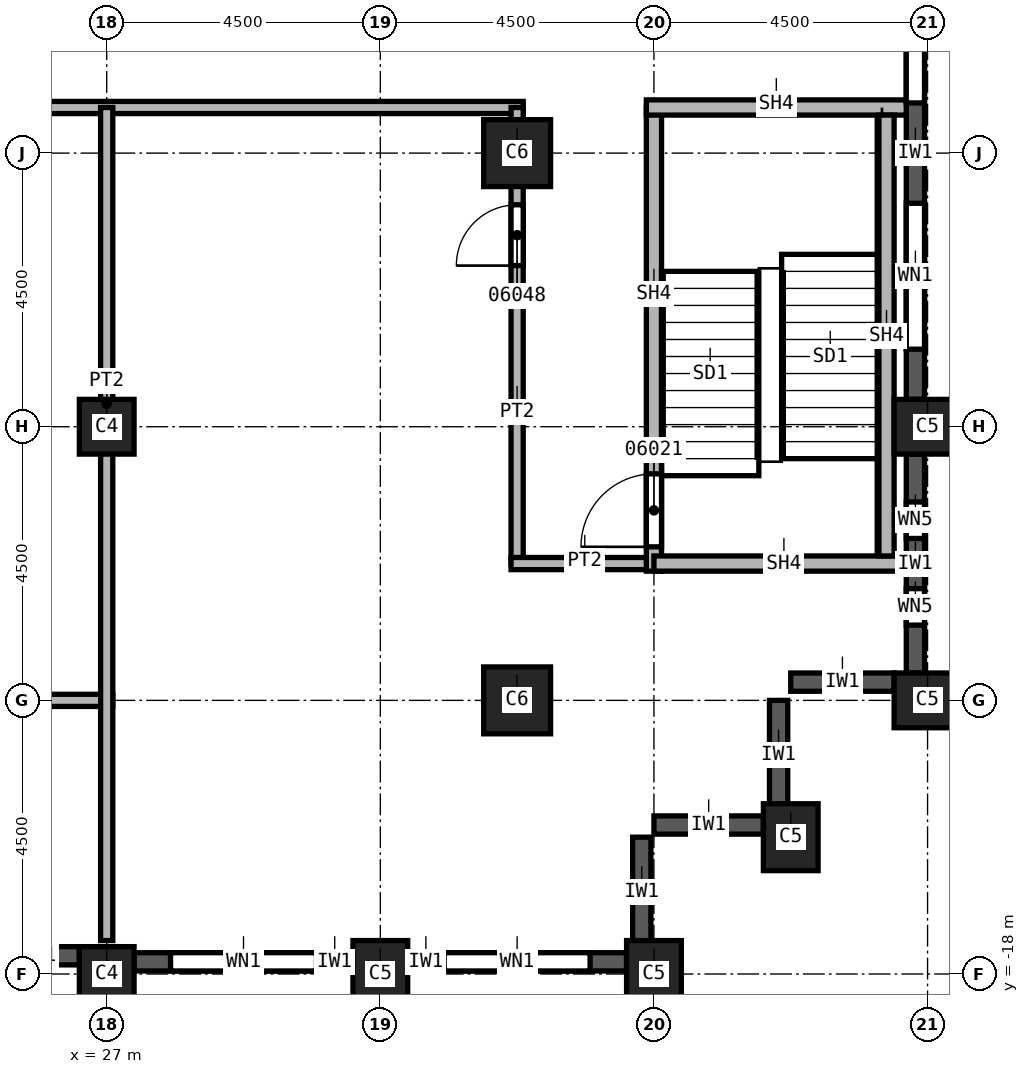
"""IFC4 building model, lengths in metres.
Left out: names, types, materials, properties, quantities, classifications, styles, units other than length and angle.
Written with IfcOpenShell. Run it as: python <this file> out.ifc"""

import sys

from ifc_helpers import new_model, si_unit, direction, frame, frame_2d, origin, origin_2d, place, context, subcontext, project, spatial, rectangle, extrude, element, fill, save


model = new_model("IFC4")
c1 = context("Model", 3, precision=1e-05, world=origin(), true_north=direction((0.0, 1.0)))
c2 = subcontext(c1, "Body", "Model", "MODEL_VIEW")
j1 = project(units=[si_unit("LENGTHUNIT", "METRE"), si_unit("PLANEANGLEUNIT", "RADIAN")], contexts=[c1])
p1 = place(None, origin())
s1 = spatial("IfcSite", under=j1, at=p1, CompositionType="ELEMENT")
p2 = place(p1, origin())
s2 = spatial("IfcBuilding", under=s1, at=p2, CompositionType="ELEMENT")
p3 = place(p2, frame((0.0, 0.0, 130.0)))
s3 = spatial("IfcBuildingStorey", under=s2, at=p3, CompositionType="ELEMENT", Elevation=130.0)
for number, where, z_axis, x_axis in (
    (1, (40.5, -9.0, 0.0), (0.0, 0.0, 1.0), (0.0, 1.0, 0.0)),
    (2, (40.5, -13.5, 0.0), (0.0, 0.0, 1.0), (0.0, 1.0, 0.0)),
    (3, (38.25, -15.75, 0.0), (0.0, 0.0, 1.0), (1.0, 0.0, 0.0)),
    (4, (31.5, -18.0, 0.0), (0.0, 0.0, 1.0), (1.0, 0.0, 0.0)),
    (5, (36.0, -18.0, 0.0), (0.0, 0.0, 1.0), (1.0, 0.0, 0.0)),
):
    element("IfcColumn", number, at=place(p3, frame(where, z_axis=z_axis, x_axis=x_axis)), inside=s3, PredefinedType="COLUMN", context=c2, shape_type="SweptSolid", body=[
        extrude(rectangle(XDim=0.9, YDim=1.1, at=origin_2d()), origin(), (0.0, 0.0, 1.0), 3.7),
    ])
for number, where, z_axis, x_axis in (
    (6, (33.75, -4.5, 0.0), (0.0, 0.0, 1.0), (1.0, 0.0, 0.0)),
    (7, (33.75, -13.5, 0.0), (0.0, 0.0, 1.0), (1.0, 0.0, 0.0)),
):
    element("IfcColumn", number, at=place(p3, frame(where, z_axis=z_axis, x_axis=x_axis)), inside=s3, PredefinedType="COLUMN", context=c2, shape_type="SweptSolid", body=[
        extrude(rectangle(XDim=1.1, YDim=1.1, at=origin_2d()), origin(), (0.0, 0.0, 1.0), 3.7),
    ])
for number, where, z_axis, x_axis in (
    (8, (27.0, -9.0, 0.0), (0.0, 0.0, 1.0), (1.0, 0.0, 0.0)),
    (9, (27.0, -18.0, 0.0), (0.0, 0.0, 1.0), (1.0, 0.0, 0.0)),
):
    element("IfcColumn", number, at=place(p3, frame(where, z_axis=z_axis, x_axis=x_axis)), inside=s3, PredefinedType="COLUMN", context=c2, shape_type="SweptSolid", body=[
        extrude(rectangle(XDim=0.9, YDim=0.9, at=origin_2d()), origin(), (0.0, 0.0, 1.0), 3.7),
    ])
for number, where, z_axis, x_axis in (
    (10, (35.8, -17.55, 0.0), (0.0, 0.0, 1.0), (0.0, 1.0, 0.0)),
    (11, (37.8, -15.55, 0.0), (0.0, 0.0, 1.0), (-1.0, 0.0, 0.0)),
    (12, (38.05, -15.3, 0.0), (0.0, 0.0, 1.0), (0.0, 1.0, 0.0)),
):
    element("IfcWall", number, at=place(p3, frame(where, z_axis=z_axis, x_axis=x_axis)), inside=s3, PredefinedType="SOLIDWALL", context=c2, shape_type="SweptSolid", body=[
        extrude(rectangle(XDim=1.8, YDim=0.3, at=frame_2d((0.9, 0.0))), origin(), (0.0, 0.0, 1.0), 3.1),
    ])
p4 = place(p3, frame((39.95, -13.2, 0.0), z_axis=(0.0, 0.0, 1.0), x_axis=(-1.0, 0.0, 0.0)))
e13 = element("IfcWall", 13, at=p4, inside=s3, PredefinedType="SOLIDWALL", context=c2, shape_type="SweptSolid", body=[
    extrude(rectangle(XDim=1.7, YDim=0.3, at=frame_2d((0.85, 0.0))), origin(), (0.0, 0.0, 1.0), 3.1),
])
p5 = place(p3, frame((25.2, -17.7, 0.0), z_axis=(0.0, 0.0, 1.0), x_axis=(1.0, 0.0, 0.0)))
e14 = element("IfcWall", 14, at=p5, inside=s3, PredefinedType="SOLIDWALL", context=c2, shape_type="SweptSolid", body=[
    extrude(rectangle(XDim=1.35, YDim=0.3, at=frame_2d((0.675, 0.0))), origin(), (0.0, 0.0, 1.0), 3.1),
])
p6 = place(p3, frame((27.45, -17.8, 0.0), z_axis=(0.0, 0.0, 1.0), x_axis=(1.0, 0.0, 0.0)))
e15 = element("IfcWall", 15, at=p6, inside=s3, PredefinedType="SOLIDWALL", context=c2, shape_type="SweptSolid", body=[
    extrude(rectangle(XDim=3.6, YDim=0.3, at=frame_2d((1.8, 0.0))), origin(), (0.0, 0.0, 1.0), 3.1),
])
p7 = place(p6, frame((0.6, 0.0, 0.8)))
e16 = element("IfcOpeningElement", 16, at=p7, cuts=e15, PredefinedType="OPENING", context=c2, shape_type="SweptSolid", body=[
    extrude(rectangle(XDim=2.4, YDim=1.95, at=frame_2d((1.2, 0.975))), frame((0.0, 0.15, 0.0), z_axis=(0.0, -1.0, 0.0), x_axis=(1.0, 0.0, 0.0)), (0.0, 0.0, 1.0), 0.3),
])
p8 = place(p3, frame((31.95, -17.8, 0.0), z_axis=(0.0, 0.0, 1.0), x_axis=(1.0, 0.0, 0.0)))
e17 = element("IfcWall", 17, at=p8, inside=s3, PredefinedType="SOLIDWALL", context=c2, shape_type="SweptSolid", body=[
    extrude(rectangle(XDim=3.6, YDim=0.3, at=frame_2d((1.8, 0.0))), origin(), (0.0, 0.0, 1.0), 3.1),
])
p9 = place(p8, frame((0.6, 0.0, 0.8)))
e18 = element("IfcOpeningElement", 18, at=p9, cuts=e17, PredefinedType="OPENING", context=c2, shape_type="SweptSolid", body=[
    extrude(rectangle(XDim=2.4, YDim=1.95, at=frame_2d((1.2, 0.975))), frame((0.0, 0.15, 0.0), z_axis=(0.0, -1.0, 0.0), x_axis=(1.0, 0.0, 0.0)), (0.0, 0.0, 1.0), 0.3),
])
p10 = place(p3, frame((40.3, -13.05, 0.0), z_axis=(0.0, 0.0, 1.0), x_axis=(0.0, 1.0, 0.0)))
e19 = element("IfcWall", 19, at=p10, inside=s3, PredefinedType="SOLIDWALL", context=c2, shape_type="SweptSolid", body=[
    extrude(rectangle(XDim=3.6, YDim=0.3, at=frame_2d((1.8, 0.0))), origin(), (0.0, 0.0, 1.0), 3.1),
])
p11 = place(p10, frame((0.788, 0.0, 0.8)))
e20 = element("IfcOpeningElement", 20, at=p11, cuts=e19, PredefinedType="OPENING", context=c2, shape_type="SweptSolid", body=[
    extrude(rectangle(XDim=0.6, YDim=1.95, at=frame_2d((0.3, 0.975))), frame((0.0, 0.15, 0.0), z_axis=(0.0, -1.0, 0.0), x_axis=(1.0, 0.0, 0.0)), (0.0, 0.0, 1.0), 0.3),
])
p12 = place(p10, frame((2.212, 0.0, 0.8)))
e21 = element("IfcOpeningElement", 21, at=p12, cuts=e19, PredefinedType="OPENING", context=c2, shape_type="SweptSolid", body=[
    extrude(rectangle(XDim=0.6, YDim=1.95, at=frame_2d((0.3, 0.975))), frame((0.0, 0.15, 0.0), z_axis=(0.0, -1.0, 0.0), x_axis=(1.0, 0.0, 0.0)), (0.0, 0.0, 1.0), 0.3),
])
p13 = place(p3, frame((40.3, -8.55, 0.0), z_axis=(0.0, 0.0, 1.0), x_axis=(0.0, 1.0, 0.0)))
e22 = element("IfcWall", 22, at=p13, inside=s3, PredefinedType="SOLIDWALL", context=c2, shape_type="SweptSolid", body=[
    extrude(rectangle(XDim=8.1, YDim=0.3, at=frame_2d((4.05, 0.0))), origin(), (0.0, 0.0, 1.0), 3.1),
])
p14 = place(p13, frame((0.825, 0.0, 0.8)))
e23 = element("IfcOpeningElement", 23, at=p14, cuts=e22, PredefinedType="OPENING", context=c2, shape_type="SweptSolid", body=[
    extrude(rectangle(XDim=2.4, YDim=1.95, at=frame_2d((1.2, 0.975))), frame((0.0, 0.15, 0.0), z_axis=(0.0, -1.0, 0.0), x_axis=(1.0, 0.0, 0.0)), (0.0, 0.0, 1.0), 0.3),
])
p15 = place(p13, frame((4.875, 0.0, 0.8)))
e24 = element("IfcOpeningElement", 24, at=p15, cuts=e22, PredefinedType="OPENING", context=c2, shape_type="SweptSolid", body=[
    extrude(rectangle(XDim=2.4, YDim=1.95, at=frame_2d((1.2, 0.975))), frame((0.0, 0.15, 0.0), z_axis=(0.0, -1.0, 0.0), x_axis=(1.0, 0.0, 0.0)), (0.0, 0.0, 1.0), 0.3),
])
p16 = place(p3, frame((15.4, -13.5, 0.0), z_axis=(0.0, 0.0, 1.0), x_axis=(1.0, 0.0, 0.0)))
e25 = element("IfcWall", 25, at=p16, inside=s3, PredefinedType="PARTITIONING", context=c2, shape_type="SweptSolid", body=[
    extrude(rectangle(XDim=11.7, YDim=0.2, at=frame_2d((5.85, 0.0))), origin(), (0.0, 0.0, 1.0), 3.7),
])
p17 = place(p3, frame((33.85, -3.75, 0.0), z_axis=(0.0, 0.0, 1.0), x_axis=(-1.0, 0.0, 0.0)))
e26 = element("IfcWall", 26, at=p17, inside=s3, PredefinedType="PARTITIONING", context=c2, shape_type="SweptSolid", body=[
    extrude(rectangle(XDim=18.45, YDim=0.2, at=frame_2d((9.225, 0.0))), origin(), (0.0, 0.0, 1.0), 3.7),
])
p18 = place(p3, frame((27.0, -3.75, 0.0), z_axis=(0.0, 0.0, 1.0), x_axis=(0.0, -1.0, 0.0)))
e27 = element("IfcWall", 27, at=p18, inside=s3, PredefinedType="PARTITIONING", context=c2, shape_type="SweptSolid", body=[
    extrude(rectangle(XDim=13.7, YDim=0.2, at=frame_2d((6.85, 0.0))), origin(), (0.0, 0.0, 1.0), 3.7),
])
p19 = place(p3, frame((33.75, -11.25, 0.0), z_axis=(0.0, 0.0, 1.0), x_axis=(0.0, 1.0, 0.0)))
e28 = element("IfcWall", 28, at=p19, inside=s3, PredefinedType="PARTITIONING", context=c2, shape_type="SweptSolid", body=[
    extrude(rectangle(XDim=7.5, YDim=0.2, at=frame_2d((3.75, 0.0))), origin(), (0.0, 0.0, 1.0), 3.7),
])
p20 = place(p19, frame((4.9, 0.0, 0.0)))
e29 = element("IfcOpeningElement", 29, at=p20, cuts=e28, PredefinedType="OPENING", context=c2, shape_type="SweptSolid", body=[
    extrude(rectangle(XDim=1.0, YDim=2.1, at=frame_2d((0.5, 1.05))), frame((0.0, 0.1, 0.0), z_axis=(0.0, -1.0, 0.0), x_axis=(1.0, 0.0, 0.0)), (0.0, 0.0, 1.0), 0.2),
])
p21 = place(p3, frame((36.0, -11.25, 0.0), z_axis=(0.0, 0.0, 1.0), x_axis=(-1.0, 0.0, 0.0)))
e30 = element("IfcWall", 30, at=p21, inside=s3, PredefinedType="PARTITIONING", context=c2, shape_type="SweptSolid", body=[
    extrude(rectangle(XDim=2.35, YDim=0.2, at=frame_2d((1.175, 0.0))), origin(), (0.0, 0.0, 1.0), 3.7),
])
p22 = place(p3, frame((36.0, -11.375, 0.0), z_axis=(0.0, 0.0, 1.0), x_axis=(0.0, 1.0, 0.0)))
e31 = element("IfcWall", 31, at=p22, inside=s3, PredefinedType="SOLIDWALL", context=c2, shape_type="SweptSolid", body=[
    extrude(rectangle(XDim=7.625, YDim=0.25, at=frame_2d((3.812, 0.0))), origin(), (0.0, 0.0, 1.0), 3.7),
])
p23 = place(p22, frame((0.4, 0.0, 0.0)))
e32 = element("IfcOpeningElement", 32, at=p23, cuts=e31, PredefinedType="OPENING", context=c2, shape_type="SweptSolid", body=[
    extrude(rectangle(XDim=1.2, YDim=2.1, at=frame_2d((0.6, 1.05))), frame((0.0, 0.125, 0.0), z_axis=(0.0, -1.0, 0.0), x_axis=(1.0, 0.0, 0.0)), (0.0, 0.0, 1.0), 0.25),
])
p24 = place(p3, frame((40.15, -11.25, 0.0), z_axis=(0.0, 0.0, 1.0), x_axis=(-1.0, 0.0, 0.0)))
e33 = element("IfcWall", 33, at=p24, inside=s3, PredefinedType="SOLIDWALL", context=c2, shape_type="SweptSolid", body=[
    extrude(rectangle(XDim=4.15, YDim=0.25, at=frame_2d((2.075, 0.0))), origin(), (0.0, 0.0, 1.0), 3.7),
])
p25 = place(p3, frame((40.15, -3.75, 0.0), z_axis=(0.0, 0.0, 1.0), x_axis=(-1.0, 0.0, 0.0)))
e34 = element("IfcWall", 34, at=p25, inside=s3, PredefinedType="SOLIDWALL", context=c2, shape_type="SweptSolid", body=[
    extrude(rectangle(XDim=4.275, YDim=0.25, at=frame_2d((2.137, 0.0))), origin(), (0.0, 0.0, 1.0), 3.7),
])
p26 = place(p3, frame((39.825, -11.125, 0.0), z_axis=(0.0, 0.0, 1.0), x_axis=(0.0, 1.0, 0.0)))
e35 = element("IfcWall", 35, at=p26, inside=s3, PredefinedType="SOLIDWALL", context=c2, shape_type="SweptSolid", body=[
    extrude(rectangle(XDim=7.25, YDim=0.25, at=frame_2d((3.625, 0.0))), origin(), (0.0, 0.0, 1.0), 3.7),
])
p27 = place(p7, origin())
e36 = element("IfcWindow", 36, at=p27, inside=s3, PartitioningType="SINGLE_PANEL", PredefinedType="WINDOW", context=c2, shape_type="SweptSolid", body=[
    extrude(rectangle(XDim=2.4, YDim=1.95, at=frame_2d((1.2, 0.975))), frame((0.0, 0.03, 0.0), z_axis=(0.0, -1.0, 0.0), x_axis=(1.0, 0.0, 0.0)), (0.0, 0.0, 1.0), 0.06),
])
fill(e16, e36)
p28 = place(p9, origin())
e37 = element("IfcWindow", 37, at=p28, inside=s3, PartitioningType="SINGLE_PANEL", PredefinedType="WINDOW", context=c2, shape_type="SweptSolid", body=[
    extrude(rectangle(XDim=2.4, YDim=1.95, at=frame_2d((1.2, 0.975))), frame((0.0, 0.03, 0.0), z_axis=(0.0, -1.0, 0.0), x_axis=(1.0, 0.0, 0.0)), (0.0, 0.0, 1.0), 0.06),
])
fill(e18, e37)
p29 = place(p14, origin())
e38 = element("IfcWindow", 38, at=p29, inside=s3, PartitioningType="SINGLE_PANEL", PredefinedType="WINDOW", context=c2, shape_type="SweptSolid", body=[
    extrude(rectangle(XDim=2.4, YDim=1.95, at=frame_2d((1.2, 0.975))), frame((0.0, 0.03, 0.0), z_axis=(0.0, -1.0, 0.0), x_axis=(1.0, 0.0, 0.0)), (0.0, 0.0, 1.0), 0.06),
])
fill(e23, e38)
p30 = place(p15, origin())
e39 = element("IfcWindow", 39, at=p30, inside=s3, PartitioningType="SINGLE_PANEL", PredefinedType="WINDOW", context=c2, shape_type="SweptSolid", body=[
    extrude(rectangle(XDim=2.4, YDim=1.95, at=frame_2d((1.2, 0.975))), frame((0.0, 0.03, 0.0), z_axis=(0.0, -1.0, 0.0), x_axis=(1.0, 0.0, 0.0)), (0.0, 0.0, 1.0), 0.06),
])
fill(e24, e39)
p31 = place(p23, origin())
e40 = element("IfcDoor", 40, at=p31, inside=s3, OperationType="SINGLE_SWING_RIGHT", PredefinedType="DOOR", context=c2, shape_type="SweptSolid", body=[
    extrude(rectangle(XDim=1.2, YDim=2.1, at=frame_2d((0.6, 1.05))), frame((0.0, 0.025, 0.0), z_axis=(0.0, -1.0, 0.0), x_axis=(1.0, 0.0, 0.0)), (0.0, 0.0, 1.0), 0.05),
])
fill(e32, e40)
p32 = place(p20, origin())
e41 = element("IfcDoor", 41, at=p32, inside=s3, OperationType="SINGLE_SWING_LEFT", PredefinedType="DOOR", context=c2, shape_type="SweptSolid", body=[
    extrude(rectangle(XDim=1.0, YDim=2.1, at=frame_2d((0.5, 1.05))), frame((0.0, 0.025, 0.0), z_axis=(0.0, -1.0, 0.0), x_axis=(1.0, 0.0, 0.0)), (0.0, 0.0, 1.0), 0.05),
])
fill(e29, e41)
p33 = place(p11, origin())
e42 = element("IfcWindow", 42, at=p33, inside=s3, PartitioningType="SINGLE_PANEL", PredefinedType="WINDOW", context=c2, shape_type="SweptSolid", body=[
    extrude(rectangle(XDim=0.6, YDim=1.95, at=frame_2d((0.3, 0.975))), frame((0.0, 0.03, 0.0), z_axis=(0.0, -1.0, 0.0), x_axis=(1.0, 0.0, 0.0)), (0.0, 0.0, 1.0), 0.06),
])
fill(e20, e42)
p34 = place(p12, origin())
e43 = element("IfcWindow", 43, at=p34, inside=s3, PartitioningType="SINGLE_PANEL", PredefinedType="WINDOW", context=c2, shape_type="SweptSolid", body=[
    extrude(rectangle(XDim=0.6, YDim=1.95, at=frame_2d((0.3, 0.975))), frame((0.0, 0.03, 0.0), z_axis=(0.0, -1.0, 0.0), x_axis=(1.0, 0.0, 0.0)), (0.0, 0.0, 1.0), 0.06),
])
fill(e21, e43)
save(model, sys.argv[1])
